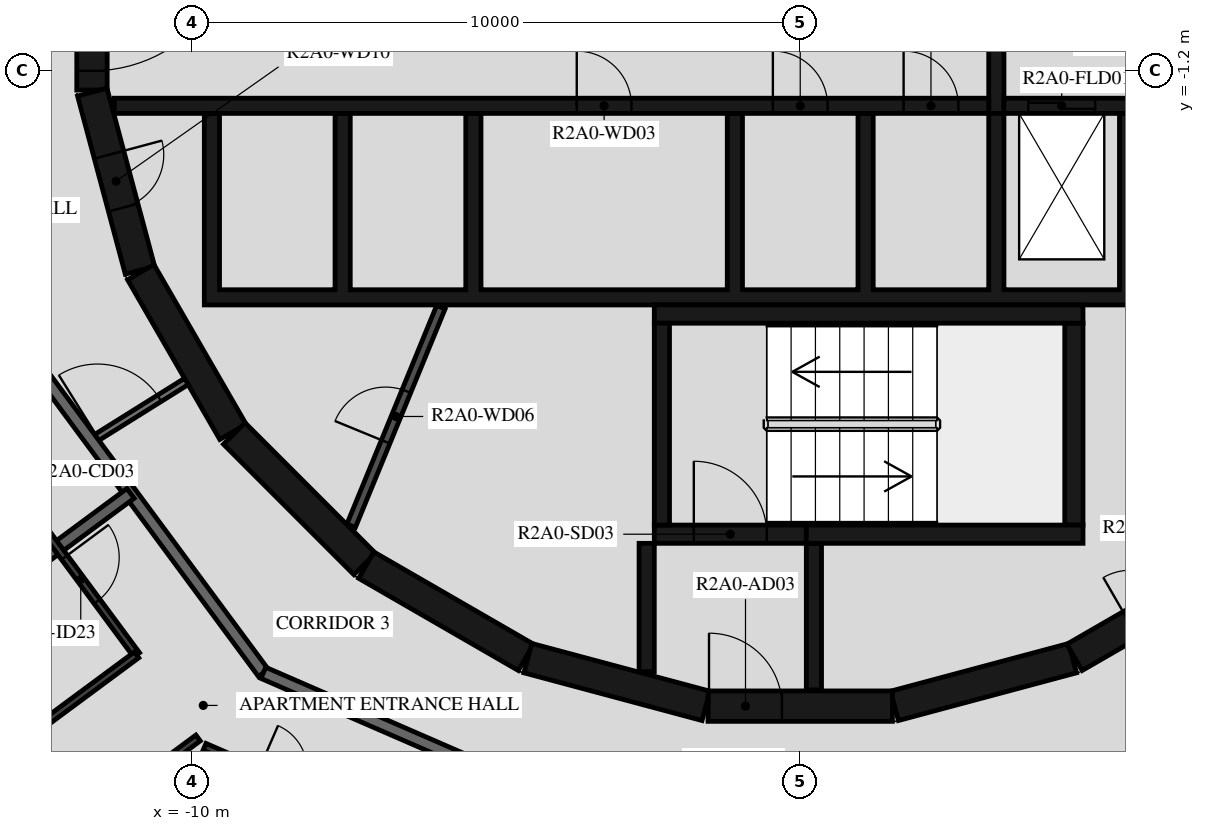
"""IFC4 building model, lengths in metres.
Left out: names, types, materials, properties, quantities, classifications, styles, units other than length and angle.
Written with IfcOpenShell. Run it as: python <this file> out.ifc"""

import sys

from ifc_helpers import new_model, si_unit, direction, frame, frame_2d, origin, place, context, subcontext, project, spatial, polyline, rectangle, outline, extrude, element, fill, save


model = new_model("IFC4")
c1 = context("Model", 3, precision=1e-05, world=origin(), true_north=direction((0.0, 1.0)))
c2 = subcontext(c1, "Body", "Model", "MODEL_VIEW")
j1 = project(units=[si_unit("LENGTHUNIT", "METRE"), si_unit("PLANEANGLEUNIT", "RADIAN")], contexts=[c1])
p1 = place(None, origin())
s1 = spatial("IfcSite", under=j1, at=p1, CompositionType="ELEMENT")
p2 = place(p1, origin())
s2 = spatial("IfcBuilding", under=s1, at=p2, CompositionType="ELEMENT")
p3 = place(p2, frame((0.0, 0.0, 76.7)))
s3 = spatial("IfcBuildingStorey", under=s2, at=p3, CompositionType="ELEMENT", Elevation=76.7)
p4 = place(p3, frame((1.55, -11.643, 0.0), z_axis=(0.0, 0.0, 1.0), x_axis=(0.965948410781, 0.258734743916, 0.0)))
e1 = element("IfcWall", 1, at=p4, inside=s3, PredefinedType="SHEAR", context=c2, shape_type="SweptSolid", body=[
    extrude(rectangle(XDim=3.033, YDim=0.5, at=frame_2d((1.516, 0.0))), origin(), (0.0, 0.0, 1.0), 3.12),
])
p5 = place(p3, frame((4.51, -10.845, 0.0), z_axis=(0.0, 0.0, 1.0), x_axis=(0.865975092491, 0.500087131594, 0.0)))
e2 = element("IfcWall", 2, at=p5, inside=s3, PredefinedType="SHEAR", context=c2, shape_type="SweptSolid", body=[
    extrude(rectangle(XDim=3.033, YDim=0.5, at=frame_2d((1.516, 0.0))), origin(), (0.0, 0.0, 1.0), 3.12),
])
p6 = place(p5, frame((1.066, 0.0, 0.0)))
e3 = element("IfcOpeningElement", 3, at=p6, cuts=e2, PredefinedType="OPENING", context=c2, shape_type="SweptSolid", body=[
    extrude(rectangle(XDim=0.9, YDim=2.1, at=frame_2d((0.45, 1.05))), frame((0.0, 0.26, 0.0), z_axis=(0.0, -1.0, 0.0), x_axis=(1.0, 0.0, 0.0)), (0.0, 0.0, 1.0), 0.52),
])
p7 = place(p3, frame((-11.647, 1.516, 0.0), z_axis=(0.0, 0.0, 1.0), x_axis=(0.0, -1.0, 0.0)))
e4 = element("IfcWall", 4, at=p7, inside=s3, PredefinedType="SHEAR", context=c2, shape_type="SweptSolid", body=[
    extrude(rectangle(XDim=3.033, YDim=0.5, at=frame_2d((1.516, 0.0))), origin(), (0.0, 0.0, 1.0), 3.12),
])
p8 = place(p7, frame((0.316, 0.0, 0.0)))
e5 = element("IfcOpeningElement", 5, at=p8, cuts=e4, PredefinedType="OPENING", context=c2, shape_type="SweptSolid", body=[
    extrude(rectangle(XDim=2.4, YDim=2.1, at=frame_2d((1.2, 1.05))), frame((0.0, 0.26, 0.0), z_axis=(0.0, -1.0, 0.0), x_axis=(1.0, 0.0, 0.0)), (0.0, 0.0, 1.0), 0.52),
])
p9 = place(p3, frame((-11.643, -1.55, 0.0), z_axis=(0.0, 0.0, 1.0), x_axis=(0.258734743916, -0.965948410781, 0.0)))
e6 = element("IfcWall", 6, at=p9, inside=s3, PredefinedType="SHEAR", context=c2, shape_type="SweptSolid", body=[
    extrude(rectangle(XDim=3.033, YDim=0.5, at=frame_2d((1.516, 0.0))), origin(), (0.0, 0.0, 1.0), 3.12),
])
p10 = place(p9, frame((1.066, 0.0, 0.0)))
e7 = element("IfcOpeningElement", 7, at=p10, cuts=e6, PredefinedType="OPENING", context=c2, shape_type="SweptSolid", body=[
    extrude(rectangle(XDim=0.9, YDim=2.1, at=frame_2d((0.45, 1.05))), frame((0.0, 0.26, 0.0), z_axis=(0.0, -1.0, 0.0), x_axis=(1.0, 0.0, 0.0)), (0.0, 0.0, 1.0), 0.52),
])
p11 = place(p3, frame((-10.845, -4.51, 0.0), z_axis=(0.0, 0.0, 1.0), x_axis=(0.500087131594, -0.865975092491, 0.0)))
e8 = element("IfcWall", 8, at=p11, inside=s3, PredefinedType="SHEAR", context=c2, shape_type="SweptSolid", body=[
    extrude(rectangle(XDim=3.033, YDim=0.5, at=frame_2d((1.516, 0.0))), origin(), (0.0, 0.0, 1.0), 3.12),
])
p12 = place(p3, frame((-9.308, -7.164, 0.0), z_axis=(0.0, 0.0, 1.0), x_axis=(0.707106781187, -0.707106781187, 0.0)))
e9 = element("IfcWall", 9, at=p12, inside=s3, PredefinedType="SHEAR", context=c2, shape_type="SweptSolid", body=[
    extrude(rectangle(XDim=3.032, YDim=0.5, at=frame_2d((1.516, 0.0))), origin(), (0.0, 0.0, 1.0), 3.12),
])
for number, where, z_axis, x_axis in (
    (10, (-7.137, -9.329, 0.0), (0.0, 0.0, 1.0), (0.866, -0.5, 0.0)),
    (11, (-4.479, -10.858, 0.0), (0.0, 0.0, 1.0), (0.966, -0.259, 0.0)),
):
    element("IfcWall", number, at=place(p3, frame(where, z_axis=z_axis, x_axis=x_axis)), inside=s3, PredefinedType="SHEAR", context=c2, shape_type="SweptSolid", body=[
        extrude(rectangle(XDim=3.033, YDim=0.5, at=frame_2d((1.516, 0.0))), origin(), (0.0, 0.0, 1.0), 3.12),
    ])
p13 = place(p3, frame((-1.516, -11.647, 0.0), z_axis=(0.0, 0.0, 1.0), x_axis=(1.0, 0.0, 0.0)))
e12 = element("IfcWall", 12, at=p13, inside=s3, PredefinedType="SHEAR", context=c2, shape_type="SweptSolid", body=[
    extrude(rectangle(XDim=3.033, YDim=0.5, at=frame_2d((1.516, 0.0))), origin(), (0.0, 0.0, 1.0), 3.12),
])
p14 = place(p13, frame((0.016, 0.0, 0.0)))
e13 = element("IfcOpeningElement", 13, at=p14, cuts=e12, PredefinedType="OPENING", context=c2, shape_type="SweptSolid", body=[
    extrude(rectangle(XDim=1.2, YDim=2.1, at=frame_2d((0.6, 1.05))), frame((0.0, 0.26, 0.0), z_axis=(0.0, -1.0, 0.0), x_axis=(1.0, 0.0, 0.0)), (0.0, 0.0, 1.0), 0.52),
])
p15 = place(p3, frame((-2.275, -8.67, 0.0), z_axis=(0.0, 0.0, 1.0), x_axis=(0.0, 1.0, 0.0)))
e14 = element("IfcWall", 14, at=p15, inside=s3, PredefinedType="SHEAR", context=c2, shape_type="SweptSolid", body=[
    extrude(rectangle(XDim=3.32, YDim=0.25, at=frame_2d((1.66, 0.0))), origin(), (0.0, 0.0, 1.0), 3.12),
])
p16 = place(p3, frame((-2.4, -5.2, 0.0), z_axis=(0.0, 0.0, 1.0), x_axis=(1.0, 0.0, 0.0)))
e15 = element("IfcWall", 15, at=p16, inside=s3, PredefinedType="SHEAR", context=c2, shape_type="SweptSolid", body=[
    extrude(rectangle(XDim=7.05, YDim=0.3, at=frame_2d((3.525, 0.0))), origin(), (0.0, 0.0, 1.0), 3.12),
])
p17 = place(p3, frame((4.5, -8.67, 0.0), z_axis=(0.0, 0.0, 1.0), x_axis=(0.0, 1.0, 0.0)))
e16 = element("IfcWall", 16, at=p17, inside=s3, PredefinedType="SHEAR", context=c2, shape_type="SweptSolid", body=[
    extrude(rectangle(XDim=3.32, YDim=0.3, at=frame_2d((1.66, 0.0))), origin(), (0.0, 0.0, 1.0), 3.12),
])
p18 = place(p3, frame((0.1, -8.82, 0.0), z_axis=(0.0, 0.0, 1.0), x_axis=(1.0, 0.0, 0.0)))
e17 = element("IfcWall", 17, at=p18, inside=s3, PredefinedType="SHEAR", context=c2, shape_type="SweptSolid", body=[
    extrude(rectangle(XDim=4.55, YDim=0.3, at=frame_2d((2.275, 0.0))), origin(), (0.0, 0.0, 1.0), 3.12),
])
p19 = place(p3, frame((-2.4, -8.82, 0.0), z_axis=(0.0, 0.0, 1.0), x_axis=(1.0, 0.0, 0.0)))
e18 = element("IfcWall", 18, at=p19, inside=s3, PredefinedType="SHEAR", context=c2, shape_type="SweptSolid", body=[
    extrude(rectangle(XDim=2.5, YDim=0.3, at=frame_2d((1.25, 0.0))), origin(), (0.0, 0.0, 1.0), 3.12),
])
p20 = place(p19, frame((0.65, 0.0, 0.0)))
e19 = element("IfcOpeningElement", 19, at=p20, cuts=e18, PredefinedType="OPENING", context=c2, shape_type="SweptSolid", body=[
    extrude(rectangle(XDim=1.2, YDim=2.1, at=frame_2d((0.6, 1.05))), frame((0.0, 0.16, 0.0), z_axis=(0.0, -1.0, 0.0), x_axis=(1.0, 0.0, 0.0)), (0.0, 0.0, 1.0), 0.32),
])
p21 = place(p3, frame((-2.525, -8.97, 0.0), z_axis=(0.0, 0.0, 1.0), x_axis=(0.0, -1.0, 0.0)))
e20 = element("IfcWall", 20, at=p21, inside=s3, PredefinedType="SHEAR", context=c2, shape_type="SweptSolid", body=[
    extrude(rectangle(XDim=2.11, YDim=0.25, at=frame_2d((1.055, 0.0))), origin(), (0.0, 0.0, 1.0), 3.12),
])
p22 = place(p3, frame((0.225, -8.97, 0.0), z_axis=(0.0, 0.0, 1.0), x_axis=(0.0, -1.0, 0.0)))
e21 = element("IfcWall", 21, at=p22, inside=s3, PredefinedType="SHEAR", context=c2, shape_type="SweptSolid", body=[
    extrude(rectangle(XDim=2.41, YDim=0.25, at=frame_2d((1.205, 0.0))), origin(), (0.0, 0.0, 1.0), 3.12),
])
p23 = place(p3, origin())
e22 = element("IfcWall", 22, at=p23, inside=s3, PredefinedType="SHEAR", context=c2, shape_type="SweptSolid", body=[
    extrude(outline(polyline([(9.8, -5.05), (9.8, -4.8), (9.8, -1.9), (9.55, -1.9), (9.55, -4.8), (7.65, -4.8), (7.65, -1.9), (7.4, -1.9), (7.4, -4.8), (5.5, -4.8), (5.5, -1.9), (5.25, -1.9), (5.25, -4.8), (3.35, -4.8), (3.35, -1.9), (3.1, -1.9), (3.1, -4.8), (1.2, -4.8), (1.2, -1.9), (0.95, -1.9), (0.95, -4.8), (-0.95, -4.8), (-0.95, -1.9), (-1.2, -1.9), (-1.2, -4.8), (-5.25, -4.8), (-5.25, -1.9), (-5.5, -1.9), (-5.5, -4.8), (-7.4, -4.8), (-7.4, -1.9), (-7.65, -1.9), (-7.65, -4.8), (-9.55, -4.8), (-9.55, -1.9), (-9.8, -1.9), (-9.8, -4.8), (-9.8, -5.05), (9.8, -5.05)])), origin(), (0.0, 0.0, 1.0), 3.12),
])
p24 = place(p3, frame((-11.28, -1.775, 0.0), z_axis=(0.0, 0.0, 1.0), x_axis=(1.0, 0.0, 0.0)))
e23 = element("IfcWall", 23, at=p24, inside=s3, PredefinedType="SHEAR", context=c2, shape_type="SweptSolid", body=[
    extrude(rectangle(XDim=14.38, YDim=0.25, at=frame_2d((7.19, 0.0))), origin(), (0.0, 0.0, 1.0), 3.12),
])
p25 = place(p24, frame((7.605, 0.0, 0.0)))
e24 = element("IfcOpeningElement", 24, at=p25, cuts=e23, PredefinedType="OPENING", context=c2, shape_type="SweptSolid", body=[
    extrude(rectangle(XDim=0.9, YDim=2.1, at=frame_2d((0.45, 1.05))), frame((0.0, 0.135, 0.0), z_axis=(0.0, -1.0, 0.0), x_axis=(1.0, 0.0, 0.0)), (0.0, 0.0, 1.0), 0.27),
])
p26 = place(p24, frame((10.83, 0.0, 0.0)))
e25 = element("IfcOpeningElement", 25, at=p26, cuts=e23, PredefinedType="OPENING", context=c2, shape_type="SweptSolid", body=[
    extrude(rectangle(XDim=0.9, YDim=2.1, at=frame_2d((0.45, 1.05))), frame((0.0, 0.135, 0.0), z_axis=(0.0, -1.0, 0.0), x_axis=(1.0, 0.0, 0.0)), (0.0, 0.0, 1.0), 0.27),
])
p27 = place(p24, frame((12.98, 0.0, 0.0)))
e26 = element("IfcOpeningElement", 26, at=p27, cuts=e23, PredefinedType="OPENING", context=c2, shape_type="SweptSolid", body=[
    extrude(rectangle(XDim=0.9, YDim=2.1, at=frame_2d((0.45, 1.05))), frame((0.0, 0.135, 0.0), z_axis=(0.0, -1.0, 0.0), x_axis=(1.0, 0.0, 0.0)), (0.0, 0.0, 1.0), 0.27),
])
p28 = place(p3, frame((3.35, -1.775, 0.0), z_axis=(0.0, 0.0, 1.0), x_axis=(1.0, 0.0, 0.0)))
e27 = element("IfcWall", 27, at=p28, inside=s3, PredefinedType="SHEAR", context=c2, shape_type="SweptSolid", body=[
    extrude(rectangle(XDim=7.93, YDim=0.25, at=frame_2d((3.965, 0.0))), origin(), (0.0, 0.0, 1.0), 3.12),
])
p29 = place(p28, frame((0.4, 0.0, 0.0)))
e28 = element("IfcOpeningElement", 28, at=p29, cuts=e27, PredefinedType="OPENING", context=c2, shape_type="SweptSolid", body=[
    extrude(rectangle(XDim=1.1, YDim=2.4, at=frame_2d((0.55, 1.2))), frame((0.0, 0.135, 0.0), z_axis=(0.0, -1.0, 0.0), x_axis=(1.0, 0.0, 0.0)), (0.0, 0.0, 1.0), 0.27),
])
p30 = place(p28, frame((2.55, 0.0, 0.0)))
e29 = element("IfcOpeningElement", 29, at=p30, cuts=e27, PredefinedType="OPENING", context=c2, shape_type="SweptSolid", body=[
    extrude(rectangle(XDim=1.1, YDim=2.4, at=frame_2d((0.55, 1.2))), frame((0.0, 0.135, 0.0), z_axis=(0.0, -1.0, 0.0), x_axis=(1.0, 0.0, 0.0)), (0.0, 0.0, 1.0), 0.27),
])
p31 = place(p28, frame((4.7, 0.0, 0.0)))
e30 = element("IfcOpeningElement", 30, at=p31, cuts=e27, PredefinedType="OPENING", context=c2, shape_type="SweptSolid", body=[
    extrude(rectangle(XDim=1.1, YDim=2.4, at=frame_2d((0.55, 1.2))), frame((0.0, 0.135, 0.0), z_axis=(0.0, -1.0, 0.0), x_axis=(1.0, 0.0, 0.0)), (0.0, 0.0, 1.0), 0.27),
])
p32 = place(p3, frame((3.225, -1.9, 0.0), z_axis=(0.0, 0.0, 1.0), x_axis=(0.0, 1.0, 0.0)))
e31 = element("IfcWall", 31, at=p32, inside=s3, PredefinedType="SHEAR", context=c2, shape_type="SweptSolid", body=[
    extrude(rectangle(XDim=3.8, YDim=0.25, at=frame_2d((1.9, 0.0))), origin(), (0.0, 0.0, 1.0), 3.12),
])
p33 = place(p3, frame((-7.385, -8.681, 0.0), z_axis=(0.0, 0.0, 1.0), x_axis=(0.379804590409, 0.925066739811, 0.0)))
e32 = element("IfcWall", 32, at=p33, inside=s3, PredefinedType="PARTITIONING", context=c2, shape_type="SweptSolid", body=[
    extrude(rectangle(XDim=3.885, YDim=0.15, at=frame_2d((1.942, 0.0))), origin(), (0.0, 0.0, 1.0), 3.12),
])
p34 = place(p33, frame((1.493, 0.0, 0.0)))
e33 = element("IfcOpeningElement", 33, at=p34, cuts=e32, PredefinedType="OPENING", context=c2, shape_type="SweptSolid", body=[
    extrude(rectangle(XDim=0.9, YDim=2.1, at=frame_2d((0.45, 1.05))), frame((0.0, 0.085, 0.0), z_axis=(0.0, -1.0, 0.0), x_axis=(1.0, 0.0, 0.0)), (0.0, 0.0, 1.0), 0.17),
])
p35 = place(p3, frame((-11.654, -7.282, 0.0), z_axis=(0.0, 0.0, 1.0), x_axis=(0.848117698675, 0.529807860638, 0.0)))
e34 = element("IfcWall", 34, at=p35, inside=s3, PredefinedType="PARTITIONING", context=c2, shape_type="SweptSolid", body=[
    extrude(rectangle(XDim=1.838, YDim=0.12, at=frame_2d((0.919, 0.0))), origin(), (0.0, 0.0, 1.0), 3.12),
])
p36 = place(p35, frame((0.115, 0.0, 0.0)))
e35 = element("IfcOpeningElement", 35, at=p36, cuts=e34, PredefinedType="OPENING", context=c2, shape_type="SweptSolid", body=[
    extrude(rectangle(XDim=1.2, YDim=2.1, at=frame_2d((0.6, 1.05))), frame((0.0, 0.07, 0.0), z_axis=(0.0, -1.0, 0.0), x_axis=(1.0, 0.0, 0.0)), (0.0, 0.0, 1.0), 0.14),
])
p37 = place(p3, frame((-13.196, -5.198, 0.0), z_axis=(0.0, 0.0, 1.0), x_axis=(0.594805187394, -0.803869883159, 0.0)))
e36 = element("IfcWall", 36, at=p37, inside=s3, PredefinedType="STANDARD", context=c2, shape_type="SweptSolid", body=[
    extrude(rectangle(XDim=7.342, YDim=0.2, at=frame_2d((3.671, 0.0))), origin(), (0.0, 0.0, 1.0), 3.12),
])
p38 = place(p3, frame((-8.829, -11.1, 0.0), z_axis=(0.0, 0.0, 1.0), x_axis=(0.917063622491, -0.398740908742, 0.0)))
e37 = element("IfcWall", 37, at=p38, inside=s3, PredefinedType="STANDARD", context=c2, shape_type="SweptSolid", body=[
    extrude(rectangle(XDim=7.24, YDim=0.2, at=frame_2d((3.62, 0.0))), origin(), (0.0, 0.0, 1.0), 3.12),
])
p39 = place(p38, frame((6.04, 0.0, 0.0)))
e38 = element("IfcOpeningElement", 38, at=p39, cuts=e37, PredefinedType="OPENING", context=c2, shape_type="SweptSolid", body=[
    extrude(rectangle(XDim=1.0, YDim=2.1, at=frame_2d((0.5, 1.05))), frame((0.0, 0.11, 0.0), z_axis=(0.0, -1.0, 0.0), x_axis=(1.0, 0.0, 0.0)), (0.0, 0.0, 1.0), 0.22),
])
p40 = place(p3, frame((5.198, -13.196, 0.0), z_axis=(0.0, 0.0, 1.0), x_axis=(0.803869883159, 0.594805187394, 0.0)))
e39 = element("IfcWall", 39, at=p40, inside=s3, PredefinedType="STANDARD", context=c2, shape_type="SweptSolid", body=[
    extrude(rectangle(XDim=7.342, YDim=0.2, at=frame_2d((3.671, 0.0))), origin(), (0.0, 0.0, 1.0), 3.12),
])
p41 = place(p3, frame((-15.41, -11.403, 0.0), z_axis=(0.0, 0.0, 1.0), x_axis=(0.803887568227, 0.594781285558, 0.0)))
e40 = element("IfcWall", 40, at=p41, inside=s3, PredefinedType="STANDARD", context=c2, shape_type="SweptSolid", body=[
    extrude(rectangle(XDim=5.47, YDim=0.2, at=frame_2d((2.735, 0.0))), origin(), (0.0, 0.0, 1.0), 3.12),
])
p42 = place(p3, frame((-14.641, -5.767, 0.0), z_axis=(0.0, 0.0, 1.0), x_axis=(0.594825885962, -0.803854567313, 0.0)))
e41 = element("IfcWall", 41, at=p42, inside=s3, PredefinedType="PARTITIONING", context=c2, shape_type="SweptSolid", body=[
    extrude(rectangle(XDim=6.266, YDim=0.12, at=frame_2d((3.133, 0.0))), origin(), (0.0, 0.0, 1.0), 3.12),
])
p43 = place(p42, frame((4.273, 0.0, 0.0)))
e42 = element("IfcOpeningElement", 42, at=p43, cuts=e41, PredefinedType="OPENING", context=c2, shape_type="SweptSolid", body=[
    extrude(rectangle(XDim=0.9, YDim=2.1, at=frame_2d((0.45, 1.05))), frame((0.0, 0.07, 0.0), z_axis=(0.0, -1.0, 0.0), x_axis=(1.0, 0.0, 0.0)), (0.0, 0.0, 1.0), 0.14),
])
p44 = place(p3, frame((-10.914, -10.804, 0.0), z_axis=(0.0, 0.0, 1.0), x_axis=(-0.803864616889, -0.594812304609, 0.0)))
e43 = element("IfcWall", 43, at=p44, inside=s3, PredefinedType="PARTITIONING", context=c2, shape_type="SweptSolid", body=[
    extrude(rectangle(XDim=4.008, YDim=0.12, at=frame_2d((2.004, 0.0))), origin(), (0.0, 0.0, 1.0), 3.12),
])
p45 = place(p3, frame((-13.125, -14.555, 0.0), z_axis=(0.0, 0.0, 1.0), x_axis=(0.80389374229, 0.594772940799, 0.0)))
e44 = element("IfcWall", 44, at=p45, inside=s3, PredefinedType="PARTITIONING", context=c2, shape_type="SweptSolid", body=[
    extrude(rectangle(XDim=4.008, YDim=0.12, at=frame_2d((2.004, 0.0))), origin(), (0.0, 0.0, 1.0), 3.12),
])
p46 = place(p3, frame((-9.796, -12.315, 0.0), z_axis=(0.0, 0.0, 1.0), x_axis=(0.917059572812, -0.398750222463, 0.0)))
e45 = element("IfcWall", 45, at=p46, inside=s3, PredefinedType="PARTITIONING", context=c2, shape_type="SweptSolid", body=[
    extrude(rectangle(XDim=8.146, YDim=0.12, at=frame_2d((4.073, 0.0))), origin(), (0.0, 0.0, 1.0), 3.12),
])
p47 = place(p46, frame((0.969, 0.0, 0.0)))
e46 = element("IfcOpeningElement", 46, at=p47, cuts=e45, PredefinedType="OPENING", context=c2, shape_type="SweptSolid", body=[
    extrude(rectangle(XDim=0.8, YDim=2.1, at=frame_2d((0.4, 1.05))), frame((0.0, 0.07, 0.0), z_axis=(0.0, -1.0, 0.0), x_axis=(1.0, 0.0, 0.0)), (0.0, 0.0, 1.0), 0.14),
])
p48 = place(p20, origin())
e47 = element("IfcDoor", 47, at=p48, inside=s3, OperationType="SINGLE_SWING_LEFT", PredefinedType="DOOR", context=c2, shape_type="SweptSolid", body=[
    extrude(rectangle(XDim=1.2, YDim=2.1, at=frame_2d((0.6, 1.05))), frame((0.0, 0.025, 0.0), z_axis=(0.0, -1.0, 0.0), x_axis=(1.0, 0.0, 0.0)), (0.0, 0.0, 1.0), 0.05),
])
fill(e19, e47)
p49 = place(p14, origin())
e48 = element("IfcDoor", 48, at=p49, inside=s3, OperationType="SINGLE_SWING_RIGHT", PredefinedType="DOOR", context=c2, shape_type="SweptSolid", body=[
    extrude(rectangle(XDim=1.2, YDim=2.1, at=frame_2d((0.6, 1.05))), frame((0.0, 0.025, 0.0), z_axis=(0.0, -1.0, 0.0), x_axis=(1.0, 0.0, 0.0)), (0.0, 0.0, 1.0), 0.05),
])
fill(e13, e48)
p50 = place(p8, origin())
e49 = element("IfcDoor", 49, at=p50, inside=s3, OperationType="DOUBLE_DOOR_SINGLE_SWING", PredefinedType="DOOR", context=c2, shape_type="SweptSolid", body=[
    extrude(rectangle(XDim=2.4, YDim=2.1, at=frame_2d((1.2, 1.05))), frame((0.0, 0.025, 0.0), z_axis=(0.0, -1.0, 0.0), x_axis=(1.0, 0.0, 0.0)), (0.0, 0.0, 1.0), 0.05),
])
fill(e5, e49)
p51 = place(p29, origin())
e50 = element("IfcDoor", 50, at=p51, inside=s3, OperationType="DOUBLE_DOOR_SLIDING", PredefinedType="DOOR", context=c2, shape_type="SweptSolid", body=[
    extrude(rectangle(XDim=1.1, YDim=2.4, at=frame_2d((0.55, 1.2))), frame((0.0, 0.025, 0.0), z_axis=(0.0, -1.0, 0.0), x_axis=(1.0, 0.0, 0.0)), (0.0, 0.0, 1.0), 0.05),
])
fill(e28, e50)
p52 = place(p25, origin())
e51 = element("IfcDoor", 51, at=p52, inside=s3, OperationType="SINGLE_SWING_RIGHT", PredefinedType="DOOR", context=c2, shape_type="SweptSolid", body=[
    extrude(rectangle(XDim=0.9, YDim=2.1, at=frame_2d((0.45, 1.05))), frame((0.0, 0.025, 0.0), z_axis=(0.0, -1.0, 0.0), x_axis=(1.0, 0.0, 0.0)), (0.0, 0.0, 1.0), 0.05),
])
fill(e24, e51)
p53 = place(p26, origin())
e52 = element("IfcDoor", 52, at=p53, inside=s3, OperationType="SINGLE_SWING_LEFT", PredefinedType="DOOR", context=c2, shape_type="SweptSolid", body=[
    extrude(rectangle(XDim=0.9, YDim=2.1, at=frame_2d((0.45, 1.05))), frame((0.0, 0.025, 0.0), z_axis=(0.0, -1.0, 0.0), x_axis=(1.0, 0.0, 0.0)), (0.0, 0.0, 1.0), 0.05),
])
fill(e25, e52)
p54 = place(p27, origin())
e53 = element("IfcDoor", 53, at=p54, inside=s3, OperationType="SINGLE_SWING_RIGHT", PredefinedType="DOOR", context=c2, shape_type="SweptSolid", body=[
    extrude(rectangle(XDim=0.9, YDim=2.1, at=frame_2d((0.45, 1.05))), frame((0.0, 0.025, 0.0), z_axis=(0.0, -1.0, 0.0), x_axis=(1.0, 0.0, 0.0)), (0.0, 0.0, 1.0), 0.05),
])
fill(e26, e53)
p55 = place(p34, origin())
e54 = element("IfcDoor", 54, at=p55, inside=s3, OperationType="SINGLE_SWING_LEFT", PredefinedType="DOOR", context=c2, shape_type="SweptSolid", body=[
    extrude(rectangle(XDim=0.9, YDim=2.1, at=frame_2d((0.45, 1.05))), frame((0.0, 0.025, 0.0), z_axis=(0.0, -1.0, 0.0), x_axis=(1.0, 0.0, 0.0)), (0.0, 0.0, 1.0), 0.05),
])
fill(e33, e54)
p56 = place(p10, origin())
e55 = element("IfcDoor", 55, at=p56, inside=s3, OperationType="SINGLE_SWING_LEFT", PredefinedType="DOOR", context=c2, shape_type="SweptSolid", body=[
    extrude(rectangle(XDim=0.9, YDim=2.1, at=frame_2d((0.45, 1.05))), frame((0.0, 0.025, 0.0), z_axis=(0.0, -1.0, 0.0), x_axis=(1.0, 0.0, 0.0)), (0.0, 0.0, 1.0), 0.05),
])
fill(e7, e55)
p57 = place(p43, origin())
e56 = element("IfcDoor", 56, at=p57, inside=s3, OperationType="SINGLE_SWING_LEFT", PredefinedType="DOOR", context=c2, shape_type="SweptSolid", body=[
    extrude(rectangle(XDim=0.9, YDim=2.1, at=frame_2d((0.45, 1.05))), frame((0.0, 0.025, 0.0), z_axis=(0.0, -1.0, 0.0), x_axis=(1.0, 0.0, 0.0)), (0.0, 0.0, 1.0), 0.05),
])
fill(e42, e56)
p58 = place(p36, origin())
e57 = element("IfcDoor", 57, at=p58, inside=s3, OperationType="DOUBLE_DOOR_SINGLE_SWING", PredefinedType="DOOR", context=c2, shape_type="SweptSolid", body=[
    extrude(rectangle(XDim=1.2, YDim=2.1, at=frame_2d((0.6, 1.05))), frame((0.0, 0.025, 0.0), z_axis=(0.0, -1.0, 0.0), x_axis=(1.0, 0.0, 0.0)), (0.0, 0.0, 1.0), 0.05),
])
fill(e35, e57)
save(model, sys.argv[1])
